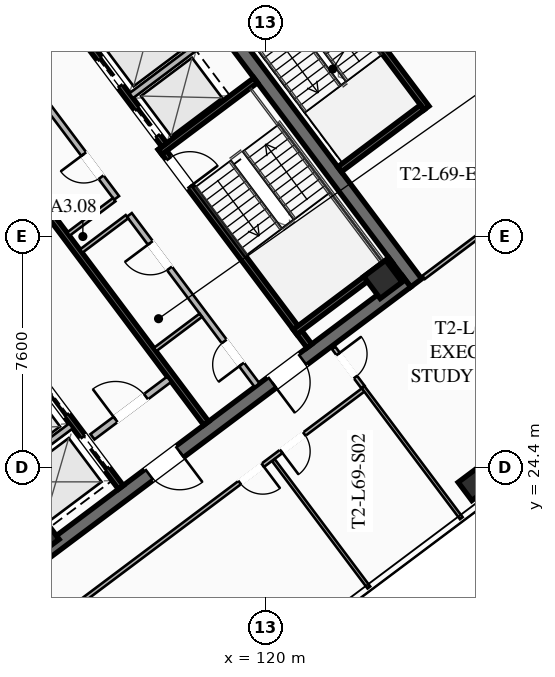
"""IFC4 building model, lengths in metres.
Left out: names, types, materials, properties, quantities, classifications, styles, units other than length and angle.
Written with IfcOpenShell. Run it as: python <this file> out.ifc"""

import sys

from ifc_helpers import new_model, si_unit, direction, frame, frame_2d, origin, origin_2d, place, context, subcontext, project, spatial, rectangle, hollow_rectangle, extrude, element, fill, save


model = new_model("IFC4")
c1 = context("Model", 3, precision=1e-05, world=origin(), true_north=direction((0.0, 1.0)))
c2 = subcontext(c1, "Body", "Model", "MODEL_VIEW")
j1 = project(units=[si_unit("LENGTHUNIT", "METRE"), si_unit("PLANEANGLEUNIT", "RADIAN")], contexts=[c1])
p1 = place(None, origin())
s1 = spatial("IfcSite", under=j1, at=p1, CompositionType="ELEMENT")
p2 = place(p1, origin())
s2 = spatial("IfcBuilding", under=s1, at=p2, CompositionType="ELEMENT")
p3 = place(p2, frame((0.0, 0.0, 255.4)))
s3 = spatial("IfcBuildingStorey", under=s2, at=p3, CompositionType="ELEMENT", Elevation=255.4)
p4 = place(p3, frame((115.604, 42.953, 0.0), z_axis=(0.0, 0.0, 1.0), x_axis=(0.600005007985, -0.799996243986, 0.0)))
e1 = element("IfcWall", 1, at=p4, inside=s3, PredefinedType="SHEAR", context=c2, shape_type="SweptSolid", body=[
    extrude(rectangle(XDim=15.6, YDim=0.45, at=frame_2d((7.8, 0.0))), origin(), (0.0, 0.0, 1.0), 4.0),
])
p5 = place(p3, frame((124.649, 30.518, 0.0), z_axis=(0.0, 0.0, 1.0), x_axis=(-0.8, -0.6, 0.0)))
e2 = element("IfcWall", 2, at=p5, inside=s3, PredefinedType="SHEAR", context=c2, shape_type="SweptSolid", body=[
    extrude(rectangle(XDim=15.26, YDim=0.45, at=frame_2d((7.63, 0.0))), origin(), (0.0, 0.0, 1.0), 4.0),
])
p6 = place(p5, frame((9.33, 0.0, 0.0)))
e3 = element("IfcOpeningElement", 3, at=p6, cuts=e2, PredefinedType="OPENING", context=c2, shape_type="SweptSolid", body=[
    extrude(rectangle(XDim=1.25, YDim=2.25, at=frame_2d((0.625, 1.125))), frame((0.0, 0.235, 0.0), z_axis=(0.0, -1.0, 0.0), x_axis=(1.0, 0.0, 0.0)), (0.0, 0.0, 1.0), 0.47),
])
p7 = place(p5, frame((4.28, 0.0, 0.0)))
e4 = element("IfcOpeningElement", 4, at=p7, cuts=e2, PredefinedType="OPENING", context=c2, shape_type="SweptSolid", body=[
    extrude(rectangle(XDim=1.25, YDim=2.25, at=frame_2d((0.625, 1.125))), frame((0.0, 0.235, 0.0), z_axis=(0.0, -1.0, 0.0), x_axis=(1.0, 0.0, 0.0)), (0.0, 0.0, 1.0), 0.47),
])
p8 = place(p3, frame((103.351, 33.482, 0.0), z_axis=(0.0, 0.0, 1.0), x_axis=(0.8, 0.6, 0.0)))
e5 = element("IfcWall", 5, at=p8, inside=s3, PredefinedType="SHEAR", context=c2, shape_type="SweptSolid", body=[
    extrude(rectangle(XDim=15.26, YDim=0.45, at=frame_2d((7.63, 0.0))), origin(), (0.0, 0.0, 1.0), 4.0),
])
p9 = place(p8, frame((4.68, 0.0, 0.0)))
e6 = element("IfcOpeningElement", 6, at=p9, cuts=e5, PredefinedType="OPENING", context=c2, shape_type="SweptSolid", body=[
    extrude(rectangle(XDim=1.25, YDim=2.25, at=frame_2d((0.625, 1.125))), frame((0.0, 0.235, 0.0), z_axis=(0.0, -1.0, 0.0), x_axis=(1.0, 0.0, 0.0)), (0.0, 0.0, 1.0), 0.47),
])
p10 = place(p8, frame((9.73, 0.0, 0.0)))
e7 = element("IfcOpeningElement", 7, at=p10, cuts=e5, PredefinedType="OPENING", context=c2, shape_type="SweptSolid", body=[
    extrude(rectangle(XDim=1.25, YDim=2.25, at=frame_2d((0.625, 1.125))), frame((0.0, 0.235, 0.0), z_axis=(0.0, -1.0, 0.0), x_axis=(1.0, 0.0, 0.0)), (0.0, 0.0, 1.0), 0.47),
])
for number, where, z_axis, x_axis in (
    (8, (112.59, 22.13, 0.0), (0.0, 0.0, 1.0), (0.8, 0.6, 0.0)),
    (9, (123.87, 30.59, 0.0), (0.0, 0.0, 1.0), (0.8, 0.6, 0.0)),
):
    element("IfcColumn", number, at=place(p3, frame(where, z_axis=z_axis, x_axis=x_axis)), inside=s3, PredefinedType="COLUMN", context=c2, shape_type="SweptSolid", body=[
        extrude(hollow_rectangle(XDim=0.9, YDim=0.9, WallThickness=0.04, at=origin_2d()), origin(), (0.0, 0.0, 1.0), 3.78),
    ])
p11 = place(p3, frame((126.87, 23.84, 0.0), z_axis=(0.0, 0.0, 1.0), x_axis=(0.799999996291, 0.600000004945, 0.0)))
e10 = element("IfcColumn", 10, at=p11, inside=s3, PredefinedType="COLUMN", context=c2, shape_type="SweptSolid", body=[
    extrude(hollow_rectangle(XDim=0.75, YDim=0.75, WallThickness=0.032, at=origin_2d()), origin(), (0.0, 0.0, 1.0), 3.78),
])
p12 = place(p3, frame((116.56, 34.92, 0.0), z_axis=(0.0, 0.0, 1.0), x_axis=(0.59999041401, -0.800007189403, 0.0)))
e11 = element("IfcWall", 11, at=p12, inside=s3, PredefinedType="SHEAR", context=c2, shape_type="SweptSolid", body=[
    extrude(rectangle(XDim=8.15, YDim=0.2, at=frame_2d((4.075, 0.0))), origin(), (0.0, 0.0, 1.0), 3.78),
])
p13 = place(p12, frame((0.45, 0.0, 0.0)))
e12 = element("IfcOpeningElement", 12, at=p13, cuts=e11, PredefinedType="OPENING", context=c2, shape_type="SweptSolid", body=[
    extrude(rectangle(XDim=1.15, YDim=2.2, at=frame_2d((0.575, 1.1))), frame((0.0, 0.11, 0.0), z_axis=(0.0, -1.0, 0.0), x_axis=(1.0, 0.0, 0.0)), (0.0, 0.0, 1.0), 0.22),
])
for number, where, z_axis, x_axis in (
    (13, (116.54, 34.78, 0.0), (0.0, 0.0, 1.0), (0.8, 0.6, 0.0)),
    (14, (120.98, 28.86, 0.0), (0.0, 0.0, 1.0), (0.8, 0.6, 0.0)),
):
    element("IfcWall", number, at=place(p3, frame(where, z_axis=z_axis, x_axis=x_axis)), inside=s3, PredefinedType="SHEAR", context=c2, shape_type="SweptSolid", body=[
        extrude(rectangle(XDim=3.93, YDim=0.2, at=frame_2d((1.965, 0.0))), origin(), (0.0, 0.0, 1.0), 3.78),
    ])
p14 = place(p3, frame((118.058, 25.856, 0.0), z_axis=(0.0, 0.0, 1.0), x_axis=(-0.600002657301, 0.799998007018, 0.0)))
e15 = element("IfcWall", 15, at=p14, inside=s3, PredefinedType="SHEAR", context=c2, shape_type="SweptSolid", body=[
    extrude(rectangle(XDim=14.7, YDim=0.2, at=frame_2d((7.35, 0.0))), origin(), (0.0, 0.0, 1.0), 3.78),
])
p15 = place(p3, frame((114.316, 25.412, 0.0), z_axis=(0.0, 0.0, 1.0), x_axis=(0.800018601094, 0.59997519774, 0.0)))
e16 = element("IfcWall", 16, at=p15, inside=s3, PredefinedType="SOLIDWALL", context=c2, shape_type="SweptSolid", body=[
    extrude(rectangle(XDim=3.15, YDim=0.22, at=frame_2d((1.575, 0.0))), origin(), (0.0, 0.0, 1.0), 2.971),
])
p16 = place(p15, frame((0.95, 0.0, 0.0)))
e17 = element("IfcOpeningElement", 17, at=p16, cuts=e16, PredefinedType="OPENING", context=c2, shape_type="SweptSolid", body=[
    extrude(rectangle(XDim=1.25, YDim=2.25, at=frame_2d((0.625, 1.125))), frame((0.0, 0.12, 0.0), z_axis=(0.0, -1.0, 0.0), x_axis=(1.0, 0.0, 0.0)), (0.0, 0.0, 1.0), 0.24),
])
p17 = place(p3, frame((115.25, 23.75, 0.0), z_axis=(0.0, 0.0, 1.0), x_axis=(-0.599994036198, 0.800004472816, 0.0)))
e18 = element("IfcWall", 18, at=p17, inside=s3, PredefinedType="SHEAR", context=c2, shape_type="SweptSolid", body=[
    extrude(rectangle(XDim=6.55, YDim=0.2, at=frame_2d((3.275, 0.0))), origin(), (0.0, 0.0, 1.0), 3.78),
])
p18 = place(p17, frame((4.975, 0.0, 0.0)))
e19 = element("IfcOpeningElement", 19, at=p18, cuts=e18, PredefinedType="OPENING", context=c2, shape_type="SweptSolid", body=[
    extrude(rectangle(XDim=1.3, YDim=2.25, at=frame_2d((0.65, 1.125))), frame((0.0, 0.11, 0.0), z_axis=(0.0, -1.0, 0.0), x_axis=(1.0, 0.0, 0.0)), (0.0, 0.0, 1.0), 0.22),
])
p19 = place(p17, frame((2.975, 0.0, 0.0)))
e20 = element("IfcOpeningElement", 20, at=p19, cuts=e18, PredefinedType="OPENING", context=c2, shape_type="SweptSolid", body=[
    extrude(rectangle(XDim=1.3, YDim=2.25, at=frame_2d((0.65, 1.125))), frame((0.0, 0.11, 0.0), z_axis=(0.0, -1.0, 0.0), x_axis=(1.0, 0.0, 0.0)), (0.0, 0.0, 1.0), 0.22),
])
p20 = place(p17, frame((0.775, 0.0, 0.0)))
e21 = element("IfcOpeningElement", 21, at=p20, cuts=e18, PredefinedType="OPENING", context=c2, shape_type="SweptSolid", body=[
    extrude(rectangle(XDim=1.3, YDim=2.25, at=frame_2d((0.65, 1.125))), frame((0.0, 0.11, 0.0), z_axis=(0.0, -1.0, 0.0), x_axis=(1.0, 0.0, 0.0)), (0.0, 0.0, 1.0), 0.22),
])
p21 = place(p3, frame((110.746, 23.622, 0.0), z_axis=(0.0, 0.0, 1.0), x_axis=(0.800008183455, 0.599989088572, 0.0)))
e22 = element("IfcWall", 22, at=p21, inside=s3, PredefinedType="SOLIDWALL", context=c2, shape_type="SweptSolid", body=[
    extrude(rectangle(XDim=3.58, YDim=0.2, at=frame_2d((1.79, 0.0))), origin(), (0.0, 0.0, 1.0), 3.78),
])
p22 = place(p3, frame((112.75, 40.25, 0.0), z_axis=(0.0, 0.0, 1.0), x_axis=(0.599994036198, -0.800004472816, 0.0)))
e23 = element("IfcWall", 23, at=p22, inside=s3, PredefinedType="SHEAR", context=c2, shape_type="SweptSolid", body=[
    extrude(rectangle(XDim=6.55, YDim=0.2, at=frame_2d((3.275, 0.0))), origin(), (0.0, 0.0, 1.0), 3.78),
])
p23 = place(p22, frame((5.075, 0.0, 0.0)))
e24 = element("IfcOpeningElement", 24, at=p23, cuts=e23, PredefinedType="OPENING", context=c2, shape_type="SweptSolid", body=[
    extrude(rectangle(XDim=1.1, YDim=2.2, at=frame_2d((0.55, 1.1))), frame((0.0, 0.11, 0.0), z_axis=(0.0, -1.0, 0.0), x_axis=(1.0, 0.0, 0.0)), (0.0, 0.0, 1.0), 0.22),
])
p24 = place(p22, frame((3.025, 0.0, 0.0)))
e25 = element("IfcOpeningElement", 25, at=p24, cuts=e23, PredefinedType="OPENING", context=c2, shape_type="SweptSolid", body=[
    extrude(rectangle(XDim=1.1, YDim=2.2, at=frame_2d((0.55, 1.1))), frame((0.0, 0.11, 0.0), z_axis=(0.0, -1.0, 0.0), x_axis=(1.0, 0.0, 0.0)), (0.0, 0.0, 1.0), 0.22),
])
p25 = place(p22, frame((1.025, 0.0, 0.0)))
e26 = element("IfcOpeningElement", 26, at=p25, cuts=e23, PredefinedType="OPENING", context=c2, shape_type="SweptSolid", body=[
    extrude(rectangle(XDim=1.1, YDim=2.2, at=frame_2d((0.55, 1.1))), frame((0.0, 0.11, 0.0), z_axis=(0.0, -1.0, 0.0), x_axis=(1.0, 0.0, 0.0)), (0.0, 0.0, 1.0), 0.22),
])
p26 = place(p3, frame((115.59, 36.63, 0.0), z_axis=(0.0, 0.0, 1.0), x_axis=(0.799975449747, 0.600032732276, 0.0)))
e27 = element("IfcWall", 27, at=p26, inside=s3, PredefinedType="SOLIDWALL", context=c2, shape_type="SweptSolid", body=[
    extrude(rectangle(XDim=3.58, YDim=0.2, at=frame_2d((1.79, 0.0))), origin(), (0.0, 0.0, 1.0), 3.78),
])
p27 = place(p3, frame((119.73, 27.11, 0.0), z_axis=(0.0, 0.0, 1.0), x_axis=(-0.600005580459, 0.799995814625, 0.0)))
e28 = element("IfcWall", 28, at=p27, inside=s3, PredefinedType="SOLIDWALL", context=c2, shape_type="SweptSolid", body=[
    extrude(rectangle(XDim=7.0, YDim=0.2, at=frame_2d((3.5, 0.0))), origin(), (0.0, 0.0, 1.0), 2.971),
])
p28 = place(p27, frame((0.85, 0.0, 0.0)))
e29 = element("IfcOpeningElement", 29, at=p28, cuts=e28, PredefinedType="OPENING", context=c2, shape_type="SweptSolid", body=[
    extrude(rectangle(XDim=0.95, YDim=2.05, at=frame_2d((0.475, 1.025))), frame((0.0, 0.11, 0.0), z_axis=(0.0, -1.0, 0.0), x_axis=(1.0, 0.0, 0.0)), (0.0, 0.0, 1.0), 0.22),
])
p29 = place(p27, frame((4.8, 0.0, 0.0)))
e30 = element("IfcOpeningElement", 30, at=p29, cuts=e28, PredefinedType="OPENING", context=c2, shape_type="SweptSolid", body=[
    extrude(rectangle(XDim=1.05, YDim=2.2, at=frame_2d((0.525, 1.1))), frame((0.0, 0.11, 0.0), z_axis=(0.0, -1.0, 0.0), x_axis=(1.0, 0.0, 0.0)), (0.0, 0.0, 1.0), 0.22),
])
for number, where, z_axis, x_axis in (
    (31, (113.946, 31.522, 0.0), (0.0, 0.0, 1.0), (0.8, 0.6, 0.0)),
    (32, (116.376, 28.282, 0.0), (0.0, 0.0, 1.0), (0.8, 0.6, 0.0)),
):
    element("IfcWall", number, at=place(p3, frame(where, z_axis=z_axis, x_axis=x_axis)), inside=s3, PredefinedType="PARTITIONING", context=c2, shape_type="SweptSolid", body=[
        extrude(rectangle(XDim=1.88, YDim=0.135, at=frame_2d((0.94, 0.0))), origin(), (0.0, 0.0, 1.0), 2.971),
    ])
p30 = place(p3, frame((115.11, 33.27, 0.0), z_axis=(0.0, 0.0, 1.0), x_axis=(-0.600011160345, 0.79999162962, 0.0)))
e33 = element("IfcWall", 33, at=p30, inside=s3, PredefinedType="SOLIDWALL", context=c2, shape_type="SweptSolid", body=[
    extrude(rectangle(XDim=7.0, YDim=0.2, at=frame_2d((3.5, 0.0))), origin(), (0.0, 0.0, 1.0), 2.971),
])
p31 = place(p30, frame((0.85, 0.0, 0.0)))
e34 = element("IfcOpeningElement", 34, at=p31, cuts=e33, PredefinedType="OPENING", context=c2, shape_type="SweptSolid", body=[
    extrude(rectangle(XDim=0.95, YDim=2.05, at=frame_2d((0.475, 1.025))), frame((0.0, 0.11, 0.0), z_axis=(0.0, -1.0, 0.0), x_axis=(1.0, 0.0, 0.0)), (0.0, 0.0, 1.0), 0.22),
])
p32 = place(p30, frame((4.85, 0.0, 0.0)))
e35 = element("IfcOpeningElement", 35, at=p32, cuts=e33, PredefinedType="OPENING", context=c2, shape_type="SweptSolid", body=[
    extrude(rectangle(XDim=0.95, YDim=2.05, at=frame_2d((0.475, 1.025))), frame((0.0, 0.11, 0.0), z_axis=(0.0, -1.0, 0.0), x_axis=(1.0, 0.0, 0.0)), (0.0, 0.0, 1.0), 0.22),
])
p33 = place(p3, frame((113.526, 32.082, 0.0), z_axis=(0.0, 0.0, 1.0), x_axis=(0.800046745961, 0.599937666993, 0.0)))
e36 = element("IfcWall", 36, at=p33, inside=s3, PredefinedType="PARTITIONING", context=c2, shape_type="SweptSolid", body=[
    extrude(rectangle(XDim=1.88, YDim=0.135, at=frame_2d((0.94, 0.0))), origin(), (0.0, 0.0, 1.0), 2.971),
])
p34 = place(p3, frame((125.304, 36.228, 0.0), z_axis=(0.0, 0.0, 1.0), x_axis=(-0.59998851072, 0.800008616831, 0.0)))
e37 = element("IfcWall", 37, at=p34, inside=s3, PredefinedType="SHEAR", context=c2, shape_type="SweptSolid", body=[
    extrude(rectangle(XDim=6.8, YDim=0.2, at=frame_2d((3.4, 0.0))), origin(), (0.0, 0.0, 1.0), 3.78),
])
p35 = place(p3, frame((122.444, 34.208, 0.0), z_axis=(0.0, 0.0, 1.0), x_axis=(0.79999138319, 0.600011488909, 0.0)))
e38 = element("IfcWall", 38, at=p35, inside=s3, PredefinedType="SHEAR", context=c2, shape_type="SweptSolid", body=[
    extrude(rectangle(XDim=3.4, YDim=0.2, at=frame_2d((1.7, 0.0))), origin(), (0.0, 0.0, 1.0), 3.78),
])
p36 = place(p3, frame((100.236, 34.302, 0.0), z_axis=(0.0, 0.0, 1.0), x_axis=(0.799997393501, 0.600003475316, 0.0)))
e39 = element("IfcWall", 39, at=p36, inside=s3, PredefinedType="PARTITIONING", context=c2, shape_type="SweptSolid", body=[
    extrude(rectangle(XDim=22.48, YDim=0.135, at=frame_2d((11.24, 0.0))), origin(), (0.0, 0.0, 1.0), 2.971),
])
p37 = place(p36, frame((0.3, 0.0, 0.0)))
e40 = element("IfcOpeningElement", 40, at=p37, cuts=e39, PredefinedType="OPENING", context=c2, shape_type="SweptSolid", body=[
    extrude(rectangle(XDim=0.95, YDim=2.05, at=frame_2d((0.475, 1.025))), frame((0.0, 0.077, 0.0), z_axis=(0.0, -1.0, 0.0), x_axis=(1.0, 0.0, 0.0)), (0.0, 0.0, 1.0), 0.155),
])
p38 = place(p36, frame((21.23, 0.0, 0.0)))
e41 = element("IfcOpeningElement", 41, at=p38, cuts=e39, PredefinedType="OPENING", context=c2, shape_type="SweptSolid", body=[
    extrude(rectangle(XDim=0.95, YDim=2.05, at=frame_2d((0.475, 1.025))), frame((0.0, 0.077, 0.0), z_axis=(0.0, -1.0, 0.0), x_axis=(1.0, 0.0, 0.0)), (0.0, 0.0, 1.0), 0.155),
])
p39 = place(p3, frame((123.262, 26.984, 0.0), z_axis=(0.0, 0.0, 1.0), x_axis=(-0.799997911818, -0.600002784232, 0.0)))
e42 = element("IfcWall", 42, at=p39, inside=s3, PredefinedType="PARTITIONING", context=c2, shape_type="SweptSolid", body=[
    extrude(rectangle(XDim=14.03, YDim=0.135, at=frame_2d((7.015, 0.0))), origin(), (0.0, 0.0, 1.0), 2.971),
])
p40 = place(p39, frame((4.18, 0.0, 0.0)))
e43 = element("IfcOpeningElement", 43, at=p40, cuts=e42, PredefinedType="OPENING", context=c2, shape_type="SweptSolid", body=[
    extrude(rectangle(XDim=0.95, YDim=2.05, at=frame_2d((0.475, 1.025))), frame((0.0, 0.077, 0.0), z_axis=(0.0, -1.0, 0.0), x_axis=(1.0, 0.0, 0.0)), (0.0, 0.0, 1.0), 0.155),
])
p41 = place(p39, frame((2.47, 0.0, 0.0)))
e44 = element("IfcOpeningElement", 44, at=p41, cuts=e42, PredefinedType="OPENING", context=c2, shape_type="SweptSolid", body=[
    extrude(rectangle(XDim=0.95, YDim=2.05, at=frame_2d((0.475, 1.025))), frame((0.0, 0.077, 0.0), z_axis=(0.0, -1.0, 0.0), x_axis=(1.0, 0.0, 0.0)), (0.0, 0.0, 1.0), 0.155),
])
p42 = place(p3, frame((122.248, 28.336, 0.0), z_axis=(0.0, 0.0, 1.0), x_axis=(0.600072788757, -0.799945403258, 0.0)))
e45 = element("IfcWall", 45, at=p42, inside=s3, PredefinedType="PARTITIONING", context=c2, shape_type="SweptSolid", body=[
    extrude(rectangle(XDim=1.61, YDim=0.135, at=frame_2d((0.805, 0.0))), origin(), (0.0, 0.0, 1.0), 2.971),
])
p43 = place(p42, frame((0.25, 0.0, 0.0)))
e46 = element("IfcOpeningElement", 46, at=p43, cuts=e45, PredefinedType="OPENING", context=c2, shape_type="SweptSolid", body=[
    extrude(rectangle(XDim=0.95, YDim=2.05, at=frame_2d((0.475, 1.025))), frame((0.0, 0.077, 0.0), z_axis=(0.0, -1.0, 0.0), x_axis=(1.0, 0.0, 0.0)), (0.0, 0.0, 1.0), 0.155),
])
p44 = place(p3, frame((123.408, 20.456, 0.0), z_axis=(0.0, 0.0, 1.0), x_axis=(-0.60000746914, 0.79999439809, 0.0)))
e47 = element("IfcWall", 47, at=p44, inside=s3, PredefinedType="PARTITIONING", context=c2, shape_type="SweptSolid", body=[
    extrude(rectangle(XDim=5.23, YDim=0.11, at=frame_2d((2.615, 0.0))), origin(), (0.0, 0.0, 1.0), 2.971),
])
p45 = place(p3, frame((126.448, 22.736, 0.0), z_axis=(0.0, 0.0, 1.0), x_axis=(-0.59998550531, 0.800010870812, 0.0)))
e48 = element("IfcWall", 48, at=p45, inside=s3, PredefinedType="PARTITIONING", context=c2, shape_type="SweptSolid", body=[
    extrude(rectangle(XDim=5.39, YDim=0.11, at=frame_2d((2.695, 0.0))), origin(), (0.0, 0.0, 1.0), 2.971),
])
p46 = place(p3, frame((125.208, 30.656, 0.0), z_axis=(0.0, 0.0, 1.0), x_axis=(0.8, 0.6, 0.0)))
e49 = element("IfcWall", 49, at=p46, inside=s3, PredefinedType="PARTITIONING", context=c2, shape_type="SweptSolid", body=[
    extrude(rectangle(XDim=6.72, YDim=0.135, at=frame_2d((3.36, 0.0))), origin(), (0.0, 0.0, 1.0), 2.971),
])
p47 = place(p6, origin())
e50 = element("IfcDoor", 50, at=p47, inside=s3, OperationType="SINGLE_SWING_LEFT", PredefinedType="DOOR", context=c2, shape_type="SweptSolid", body=[
    extrude(rectangle(XDim=1.25, YDim=2.25, at=frame_2d((0.625, 1.125))), frame((0.0, 0.025, 0.0), z_axis=(0.0, -1.0, 0.0), x_axis=(1.0, 0.0, 0.0)), (0.0, 0.0, 1.0), 0.05),
])
fill(e3, e50)
p48 = place(p7, origin())
e51 = element("IfcDoor", 51, at=p48, inside=s3, OperationType="SINGLE_SWING_RIGHT", PredefinedType="DOOR", context=c2, shape_type="SweptSolid", body=[
    extrude(rectangle(XDim=1.25, YDim=2.25, at=frame_2d((0.625, 1.125))), frame((0.0, 0.025, 0.0), z_axis=(0.0, -1.0, 0.0), x_axis=(1.0, 0.0, 0.0)), (0.0, 0.0, 1.0), 0.05),
])
fill(e4, e51)
p49 = place(p13, origin())
e52 = element("IfcDoor", 52, at=p49, inside=s3, OperationType="SINGLE_SWING_RIGHT", PredefinedType="DOOR", context=c2, shape_type="SweptSolid", body=[
    extrude(rectangle(XDim=1.15, YDim=2.2, at=frame_2d((0.575, 1.1))), frame((0.0, 0.025, 0.0), z_axis=(0.0, -1.0, 0.0), x_axis=(1.0, 0.0, 0.0)), (0.0, 0.0, 1.0), 0.05),
])
fill(e12, e52)
p50 = place(p16, origin())
e53 = element("IfcDoor", 53, at=p50, inside=s3, OperationType="SINGLE_SWING_LEFT", PredefinedType="DOOR", context=c2, shape_type="SweptSolid", body=[
    extrude(rectangle(XDim=1.25, YDim=2.25, at=frame_2d((0.625, 1.125))), frame((0.0, 0.025, 0.0), z_axis=(0.0, -1.0, 0.0), x_axis=(1.0, 0.0, 0.0)), (0.0, 0.0, 1.0), 0.05),
])
fill(e17, e53)
p51 = place(p28, origin())
e54 = element("IfcDoor", 54, at=p51, inside=s3, OperationType="SINGLE_SWING_LEFT", PredefinedType="DOOR", context=c2, shape_type="SweptSolid", body=[
    extrude(rectangle(XDim=0.95, YDim=2.05, at=frame_2d((0.475, 1.025))), frame((0.0, 0.025, 0.0), z_axis=(0.0, -1.0, 0.0), x_axis=(1.0, 0.0, 0.0)), (0.0, 0.0, 1.0), 0.05),
])
fill(e29, e54)
p52 = place(p29, origin())
e55 = element("IfcDoor", 55, at=p52, inside=s3, OperationType="SINGLE_SWING_RIGHT", PredefinedType="DOOR", context=c2, shape_type="SweptSolid", body=[
    extrude(rectangle(XDim=1.05, YDim=2.2, at=frame_2d((0.525, 1.1))), frame((0.0, 0.025, 0.0), z_axis=(0.0, -1.0, 0.0), x_axis=(1.0, 0.0, 0.0)), (0.0, 0.0, 1.0), 0.05),
])
fill(e30, e55)
p53 = place(p31, origin())
e56 = element("IfcDoor", 56, at=p53, inside=s3, OperationType="SINGLE_SWING_RIGHT", PredefinedType="DOOR", context=c2, shape_type="SweptSolid", body=[
    extrude(rectangle(XDim=0.95, YDim=2.05, at=frame_2d((0.475, 1.025))), frame((0.0, 0.025, 0.0), z_axis=(0.0, -1.0, 0.0), x_axis=(1.0, 0.0, 0.0)), (0.0, 0.0, 1.0), 0.05),
])
fill(e34, e56)
p54 = place(p40, origin())
e57 = element("IfcDoor", 57, at=p54, inside=s3, OperationType="SINGLE_SWING_LEFT", PredefinedType="DOOR", context=c2, shape_type="SweptSolid", body=[
    extrude(rectangle(XDim=0.95, YDim=2.05, at=frame_2d((0.475, 1.025))), frame((0.0, 0.025, 0.0), z_axis=(0.0, -1.0, 0.0), x_axis=(1.0, 0.0, 0.0)), (0.0, 0.0, 1.0), 0.05),
])
fill(e43, e57)
p55 = place(p41, origin())
e58 = element("IfcDoor", 58, at=p55, inside=s3, OperationType="SINGLE_SWING_RIGHT", PredefinedType="DOOR", context=c2, shape_type="SweptSolid", body=[
    extrude(rectangle(XDim=0.95, YDim=2.05, at=frame_2d((0.475, 1.025))), frame((0.0, 0.025, 0.0), z_axis=(0.0, -1.0, 0.0), x_axis=(1.0, 0.0, 0.0)), (0.0, 0.0, 1.0), 0.05),
])
fill(e44, e58)
p56 = place(p43, origin())
e59 = element("IfcDoor", 59, at=p56, inside=s3, OperationType="SINGLE_SWING_LEFT", PredefinedType="DOOR", context=c2, shape_type="SweptSolid", body=[
    extrude(rectangle(XDim=0.95, YDim=2.05, at=frame_2d((0.475, 1.025))), frame((0.0, 0.025, 0.0), z_axis=(0.0, -1.0, 0.0), x_axis=(1.0, 0.0, 0.0)), (0.0, 0.0, 1.0), 0.05),
])
fill(e46, e59)
p57 = place(p19, origin())
e60 = element("IfcDoor", 60, at=p57, inside=s3, OperationType="SLIDING_TO_LEFT", PredefinedType="DOOR", context=c2, shape_type="SweptSolid", body=[
    extrude(rectangle(XDim=1.3, YDim=2.25, at=frame_2d((0.65, 1.125))), frame((0.0, 0.025, 0.0), z_axis=(0.0, -1.0, 0.0), x_axis=(1.0, 0.0, 0.0)), (0.0, 0.0, 1.0), 0.05),
])
fill(e20, e60)
p58 = place(p20, origin())
e61 = element("IfcDoor", 61, at=p58, inside=s3, OperationType="SLIDING_TO_LEFT", PredefinedType="DOOR", context=c2, shape_type="SweptSolid", body=[
    extrude(rectangle(XDim=1.3, YDim=2.25, at=frame_2d((0.65, 1.125))), frame((0.0, 0.025, 0.0), z_axis=(0.0, -1.0, 0.0), x_axis=(1.0, 0.0, 0.0)), (0.0, 0.0, 1.0), 0.05),
])
fill(e21, e61)
p59 = place(p23, origin())
e62 = element("IfcDoor", 62, at=p59, inside=s3, OperationType="SLIDING_TO_LEFT", PredefinedType="DOOR", context=c2, shape_type="SweptSolid", body=[
    extrude(rectangle(XDim=1.1, YDim=2.2, at=frame_2d((0.55, 1.1))), frame((0.0, 0.025, 0.0), z_axis=(0.0, -1.0, 0.0), x_axis=(1.0, 0.0, 0.0)), (0.0, 0.0, 1.0), 0.05),
])
fill(e24, e62)
p60 = place(p24, origin())
e63 = element("IfcDoor", 63, at=p60, inside=s3, OperationType="SLIDING_TO_LEFT", PredefinedType="DOOR", context=c2, shape_type="SweptSolid", body=[
    extrude(rectangle(XDim=1.1, YDim=2.2, at=frame_2d((0.55, 1.1))), frame((0.0, 0.025, 0.0), z_axis=(0.0, -1.0, 0.0), x_axis=(1.0, 0.0, 0.0)), (0.0, 0.0, 1.0), 0.05),
])
fill(e25, e63)
save(model, sys.argv[1])
